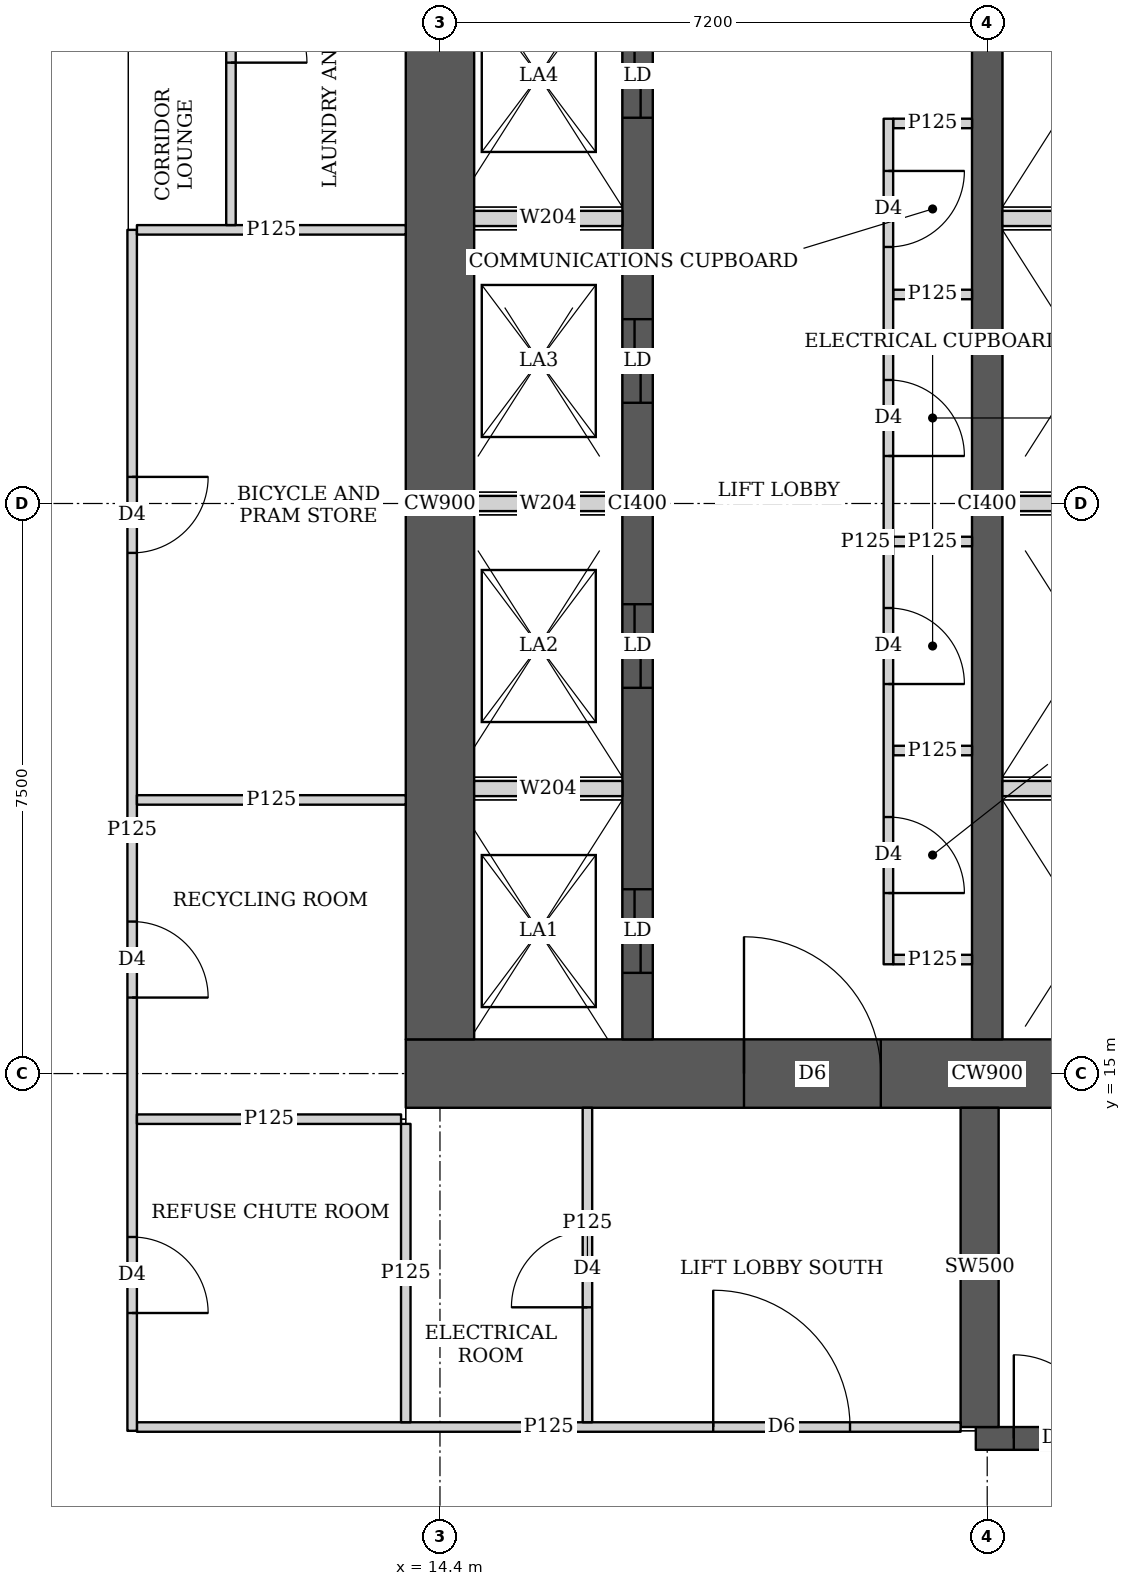
"""IFC4 building model, lengths in metres.
Left out: names, types, materials, properties, quantities, classifications, styles, units other than length and angle.
Written with IfcOpenShell. Run it as: python <this file> out.ifc"""

import sys

from ifc_helpers import new_model, si_unit, direction, frame, frame_2d, origin, place, context, subcontext, project, spatial, rectangle, extrude, element, fill, save


model = new_model("IFC4")
c1 = context("Model", 3, precision=1e-05, world=origin(), true_north=direction((0.0, 1.0)))
c2 = subcontext(c1, "Body", "Model", "MODEL_VIEW")
j1 = project(units=[si_unit("LENGTHUNIT", "METRE"), si_unit("PLANEANGLEUNIT", "RADIAN")], contexts=[c1])
p1 = place(None, origin())
s1 = spatial("IfcSite", under=j1, at=p1, CompositionType="ELEMENT")
p2 = place(p1, origin())
s2 = spatial("IfcBuilding", under=s1, at=p2, CompositionType="ELEMENT")
p3 = place(p2, frame((0.0, 0.0, 23.75)))
s3 = spatial("IfcBuildingStorey", under=s2, at=p3, CompositionType="ELEMENT", Elevation=23.75)
p4 = place(p3, frame((13.95, 15.0, 0.0), z_axis=(0.0, 0.0, 1.0), x_axis=(1.0, 0.0, 0.0)))
e1 = element("IfcWall", 1, at=p4, inside=s3, PredefinedType="SHEAR", context=c2, shape_type="SweptSolid", body=[
    extrude(rectangle(XDim=15.3, YDim=0.9, at=frame_2d((7.65, 0.0))), origin(), (0.0, 0.0, 1.0), 3.75),
])
p5 = place(p4, frame((4.45, 0.0, 0.0)))
e2 = element("IfcOpeningElement", 2, at=p5, cuts=e1, PredefinedType="OPENING", context=c2, shape_type="SweptSolid", body=[
    extrude(rectangle(XDim=1.8, YDim=2.1, at=frame_2d((0.9, 1.05))), frame((0.0, 0.46, 0.0), z_axis=(0.0, -1.0, 0.0), x_axis=(1.0, 0.0, 0.0)), (0.0, 0.0, 1.0), 0.92),
])
p6 = place(p4, frame((10.7, 0.0, 0.0)))
e3 = element("IfcOpeningElement", 3, at=p6, cuts=e1, PredefinedType="OPENING", context=c2, shape_type="SweptSolid", body=[
    extrude(rectangle(XDim=1.1, YDim=2.1, at=frame_2d((0.55, 1.05))), frame((0.0, 0.46, 0.0), z_axis=(0.0, -1.0, 0.0), x_axis=(1.0, 0.0, 0.0)), (0.0, 0.0, 1.0), 0.92),
])
p7 = place(p3, frame((14.4, 15.45, 0.0), z_axis=(0.0, 0.0, 1.0), x_axis=(0.0, 1.0, 0.0)))
e4 = element("IfcWall", 4, at=p7, inside=s3, PredefinedType="SHEAR", context=c2, shape_type="SweptSolid", body=[
    extrude(rectangle(XDim=14.1, YDim=0.9, at=frame_2d((7.05, 0.0))), origin(), (0.0, 0.0, 1.0), 3.75),
])
p8 = place(p3, frame((17.0, 15.45, 0.0), z_axis=(0.0, 0.0, 1.0), x_axis=(0.0, 1.0, 0.0)))
e5 = element("IfcWall", 5, at=p8, inside=s3, PredefinedType="SHEAR", context=c2, shape_type="SweptSolid", body=[
    extrude(rectangle(XDim=14.1, YDim=0.4, at=frame_2d((7.05, 0.0))), origin(), (0.0, 0.0, 1.0), 3.75),
])
p9 = place(p8, frame((0.875, 0.0, 0.0)))
e6 = element("IfcOpeningElement", 6, at=p9, cuts=e5, PredefinedType="OPENING", context=c2, shape_type="SweptSolid", body=[
    extrude(rectangle(XDim=1.1, YDim=2.1, at=frame_2d((0.55, 1.05))), frame((0.0, 0.21, 0.0), z_axis=(0.0, -1.0, 0.0), x_axis=(1.0, 0.0, 0.0)), (0.0, 0.0, 1.0), 0.42),
])
p10 = place(p8, frame((4.625, 0.0, 0.0)))
e7 = element("IfcOpeningElement", 7, at=p10, cuts=e5, PredefinedType="OPENING", context=c2, shape_type="SweptSolid", body=[
    extrude(rectangle(XDim=1.1, YDim=2.1, at=frame_2d((0.55, 1.05))), frame((0.0, 0.21, 0.0), z_axis=(0.0, -1.0, 0.0), x_axis=(1.0, 0.0, 0.0)), (0.0, 0.0, 1.0), 0.42),
])
p11 = place(p8, frame((8.375, 0.0, 0.0)))
e8 = element("IfcOpeningElement", 8, at=p11, cuts=e5, PredefinedType="OPENING", context=c2, shape_type="SweptSolid", body=[
    extrude(rectangle(XDim=1.1, YDim=2.1, at=frame_2d((0.55, 1.05))), frame((0.0, 0.21, 0.0), z_axis=(0.0, -1.0, 0.0), x_axis=(1.0, 0.0, 0.0)), (0.0, 0.0, 1.0), 0.42),
])
p12 = place(p8, frame((12.125, 0.0, 0.0)))
e9 = element("IfcOpeningElement", 9, at=p12, cuts=e5, PredefinedType="OPENING", context=c2, shape_type="SweptSolid", body=[
    extrude(rectangle(XDim=1.1, YDim=2.1, at=frame_2d((0.55, 1.05))), frame((0.0, 0.21, 0.0), z_axis=(0.0, -1.0, 0.0), x_axis=(1.0, 0.0, 0.0)), (0.0, 0.0, 1.0), 0.42),
])
p13 = place(p3, frame((21.6, 15.45, 0.0), z_axis=(0.0, 0.0, 1.0), x_axis=(0.0, 1.0, 0.0)))
e10 = element("IfcWall", 10, at=p13, inside=s3, PredefinedType="SHEAR", context=c2, shape_type="SweptSolid", body=[
    extrude(rectangle(XDim=14.1, YDim=0.4, at=frame_2d((7.05, 0.0))), origin(), (0.0, 0.0, 1.0), 3.75),
])
p14 = place(p3, frame((21.45, 10.2, 0.0), z_axis=(0.0, 0.0, 1.0), x_axis=(1.0, 0.0, 0.0)))
e11 = element("IfcWall", 11, at=p14, inside=s3, PredefinedType="SHEAR", context=c2, shape_type="SweptSolid", body=[
    extrude(rectangle(XDim=7.5, YDim=0.3, at=frame_2d((3.75, 0.0))), origin(), (0.0, 0.0, 1.0), 3.75),
])
p15 = place(p14, frame((0.5, 0.0, 0.0)))
e12 = element("IfcOpeningElement", 12, at=p15, cuts=e11, PredefinedType="OPENING", context=c2, shape_type="SweptSolid", body=[
    extrude(rectangle(XDim=1.1, YDim=2.1, at=frame_2d((0.55, 1.05))), frame((0.0, 0.16, 0.0), z_axis=(0.0, -1.0, 0.0), x_axis=(1.0, 0.0, 0.0)), (0.0, 0.0, 1.0), 0.32),
])
p16 = place(p3, frame((21.5, 10.35, 0.0), z_axis=(0.0, 0.0, 1.0), x_axis=(0.0, 1.0, 0.0)))
e13 = element("IfcWall", 13, at=p16, inside=s3, PredefinedType="SHEAR", context=c2, shape_type="SweptSolid", body=[
    extrude(rectangle(XDim=4.2, YDim=0.5, at=frame_2d((2.1, 0.0))), origin(), (0.0, 0.0, 1.0), 3.75),
])
p17 = place(p3, frame((10.35, 10.3, 0.0), z_axis=(0.0, 0.0, 1.0), x_axis=(0.0, 1.0, 0.0)))
e14 = element("IfcWall", 14, at=p17, inside=s3, PredefinedType="PARTITIONING", context=c2, shape_type="SweptSolid", body=[
    extrude(rectangle(XDim=15.8, YDim=0.125, at=frame_2d((7.9, 0.0))), origin(), (0.0, 0.0, 1.0), 3.5),
])
p18 = place(p17, frame((1.55, 0.0, 0.0)))
e15 = element("IfcOpeningElement", 15, at=p18, cuts=e14, PredefinedType="OPENING", context=c2, shape_type="SweptSolid", body=[
    extrude(rectangle(XDim=1.0, YDim=2.1, at=frame_2d((0.5, 1.05))), frame((0.0, 0.073, 0.0), z_axis=(0.0, -1.0, 0.0), x_axis=(1.0, 0.0, 0.0)), (0.0, 0.0, 1.0), 0.145),
])
p19 = place(p17, frame((5.7, 0.0, 0.0)))
e16 = element("IfcOpeningElement", 16, at=p19, cuts=e14, PredefinedType="OPENING", context=c2, shape_type="SweptSolid", body=[
    extrude(rectangle(XDim=1.0, YDim=2.1, at=frame_2d((0.5, 1.05))), frame((0.0, 0.073, 0.0), z_axis=(0.0, -1.0, 0.0), x_axis=(1.0, 0.0, 0.0)), (0.0, 0.0, 1.0), 0.145),
])
p20 = place(p17, frame((11.55, 0.0, 0.0)))
e17 = element("IfcOpeningElement", 17, at=p20, cuts=e14, PredefinedType="OPENING", context=c2, shape_type="SweptSolid", body=[
    extrude(rectangle(XDim=1.0, YDim=2.1, at=frame_2d((0.5, 1.05))), frame((0.0, 0.073, 0.0), z_axis=(0.0, -1.0, 0.0), x_axis=(1.0, 0.0, 0.0)), (0.0, 0.0, 1.0), 0.145),
])
p21 = place(p3, frame((11.65, 26.163, 0.0), z_axis=(0.0, 0.0, 1.0), x_axis=(0.0, 1.0, 0.0)))
e18 = element("IfcWall", 18, at=p21, inside=s3, PredefinedType="PARTITIONING", context=c2, shape_type="SweptSolid", body=[
    extrude(rectangle(XDim=5.275, YDim=0.125, at=frame_2d((2.637, 0.0))), origin(), (0.0, 0.0, 1.0), 3.5),
])
p22 = place(p21, frame((2.137, 0.0, 0.0)))
e19 = element("IfcOpeningElement", 19, at=p22, cuts=e18, PredefinedType="OPENING", context=c2, shape_type="SweptSolid", body=[
    extrude(rectangle(XDim=1.0, YDim=2.1, at=frame_2d((0.5, 1.05))), frame((0.0, 0.073, 0.0), z_axis=(0.0, -1.0, 0.0), x_axis=(1.0, 0.0, 0.0)), (0.0, 0.0, 1.0), 0.145),
])
p23 = place(p3, frame((10.413, 14.4, 0.0), z_axis=(0.0, 0.0, 1.0), x_axis=(1.0, 0.0, 0.0)))
e20 = element("IfcWall", 20, at=p23, inside=s3, PredefinedType="PARTITIONING", context=c2, shape_type="SweptSolid", body=[
    extrude(rectangle(XDim=3.475, YDim=0.125, at=frame_2d((1.737, 0.0))), origin(), (0.0, 0.0, 1.0), 3.5),
])
for number, where, z_axis, x_axis in (
    (21, (10.413, 18.6, 0.0), (0.0, 0.0, 1.0), (1.0, 0.0, 0.0)),
    (22, (10.413, 26.1, 0.0), (0.0, 0.0, 1.0), (1.0, 0.0, 0.0)),
):
    element("IfcWall", number, at=place(p3, frame(where, z_axis=z_axis, x_axis=x_axis)), inside=s3, PredefinedType="PARTITIONING", context=c2, shape_type="SweptSolid", body=[
        extrude(rectangle(XDim=3.537, YDim=0.125, at=frame_2d((1.769, 0.0))), origin(), (0.0, 0.0, 1.0), 3.5),
    ])
p24 = place(p3, frame((13.95, 10.413, 0.0), z_axis=(0.0, 0.0, 1.0), x_axis=(0.0, 1.0, 0.0)))
e23 = element("IfcWall", 23, at=p24, inside=s3, PredefinedType="PARTITIONING", context=c2, shape_type="SweptSolid", body=[
    extrude(rectangle(XDim=3.925, YDim=0.125, at=frame_2d((1.962, 0.0))), origin(), (0.0, 0.0, 1.0), 3.5),
])
p25 = place(p3, frame((10.413, 10.35, 0.0), z_axis=(0.0, 0.0, 1.0), x_axis=(1.0, 0.0, 0.0)))
e24 = element("IfcWall", 24, at=p25, inside=s3, PredefinedType="PARTITIONING", context=c2, shape_type="SweptSolid", body=[
    extrude(rectangle(XDim=10.837, YDim=0.125, at=frame_2d((5.418, 0.0))), origin(), (0.0, 0.0, 1.0), 3.5),
])
p26 = place(p25, frame((7.582, 0.0, 0.0)))
e25 = element("IfcOpeningElement", 25, at=p26, cuts=e24, PredefinedType="OPENING", context=c2, shape_type="SweptSolid", body=[
    extrude(rectangle(XDim=1.8, YDim=2.1, at=frame_2d((0.9, 1.05))), frame((0.0, 0.073, 0.0), z_axis=(0.0, -1.0, 0.0), x_axis=(1.0, 0.0, 0.0)), (0.0, 0.0, 1.0), 0.145),
])
p27 = place(p3, frame((16.34, 10.413, 0.0), z_axis=(0.0, 0.0, 1.0), x_axis=(0.0, 1.0, 0.0)))
e26 = element("IfcWall", 26, at=p27, inside=s3, PredefinedType="PARTITIONING", context=c2, shape_type="SweptSolid", body=[
    extrude(rectangle(XDim=4.137, YDim=0.125, at=frame_2d((2.068, 0.0))), origin(), (0.0, 0.0, 1.0), 3.5),
])
p28 = place(p27, frame((1.512, 0.0, 0.0)))
e27 = element("IfcOpeningElement", 27, at=p28, cuts=e26, PredefinedType="OPENING", context=c2, shape_type="SweptSolid", body=[
    extrude(rectangle(XDim=1.0, YDim=2.1, at=frame_2d((0.5, 1.05))), frame((0.0, 0.073, 0.0), z_axis=(0.0, -1.0, 0.0), x_axis=(1.0, 0.0, 0.0)), (0.0, 0.0, 1.0), 0.145),
])
p29 = place(p3, frame((20.3, 16.438, 0.0), z_axis=(0.0, 0.0, 1.0), x_axis=(0.0, 1.0, 0.0)))
e28 = element("IfcWall", 28, at=p29, inside=s3, PredefinedType="PARTITIONING", context=c2, shape_type="SweptSolid", body=[
    extrude(rectangle(XDim=11.124, YDim=0.125, at=frame_2d((5.562, 0.0))), origin(), (0.0, 0.0, 1.0), 3.5),
])
p30 = place(p29, frame((0.937, 0.0, 0.0)))
e29 = element("IfcOpeningElement", 29, at=p30, cuts=e28, PredefinedType="OPENING", context=c2, shape_type="SweptSolid", body=[
    extrude(rectangle(XDim=1.0, YDim=2.1, at=frame_2d((0.5, 1.05))), frame((0.0, 0.073, 0.0), z_axis=(0.0, -1.0, 0.0), x_axis=(1.0, 0.0, 0.0)), (0.0, 0.0, 1.0), 0.145),
])
p31 = place(p29, frame((3.687, 0.0, 0.0)))
e30 = element("IfcOpeningElement", 30, at=p31, cuts=e28, PredefinedType="OPENING", context=c2, shape_type="SweptSolid", body=[
    extrude(rectangle(XDim=1.0, YDim=2.1, at=frame_2d((0.5, 1.05))), frame((0.0, 0.073, 0.0), z_axis=(0.0, -1.0, 0.0), x_axis=(1.0, 0.0, 0.0)), (0.0, 0.0, 1.0), 0.145),
])
p32 = place(p29, frame((6.687, 0.0, 0.0)))
e31 = element("IfcOpeningElement", 31, at=p32, cuts=e28, PredefinedType="OPENING", context=c2, shape_type="SweptSolid", body=[
    extrude(rectangle(XDim=1.0, YDim=2.1, at=frame_2d((0.5, 1.05))), frame((0.0, 0.073, 0.0), z_axis=(0.0, -1.0, 0.0), x_axis=(1.0, 0.0, 0.0)), (0.0, 0.0, 1.0), 0.145),
])
p33 = place(p29, frame((9.437, 0.0, 0.0)))
e32 = element("IfcOpeningElement", 32, at=p33, cuts=e28, PredefinedType="OPENING", context=c2, shape_type="SweptSolid", body=[
    extrude(rectangle(XDim=1.0, YDim=2.1, at=frame_2d((0.5, 1.05))), frame((0.0, 0.073, 0.0), z_axis=(0.0, -1.0, 0.0), x_axis=(1.0, 0.0, 0.0)), (0.0, 0.0, 1.0), 0.145),
])
for number, where, z_axis, x_axis in (
    (33, (20.363, 16.5, 0.0), (0.0, 0.0, 1.0), (1.0, 0.0, 0.0)),
    (34, (20.363, 27.5, 0.0), (0.0, 0.0, 1.0), (1.0, 0.0, 0.0)),
    (35, (20.363, 19.25, 0.0), (0.0, 0.0, 1.0), (1.0, 0.0, 0.0)),
    (36, (20.363, 22.0, 0.0), (0.0, 0.0, 1.0), (1.0, 0.0, 0.0)),
    (37, (20.363, 25.25, 0.0), (0.0, 0.0, 1.0), (1.0, 0.0, 0.0)),
):
    element("IfcWall", number, at=place(p3, frame(where, z_axis=z_axis, x_axis=x_axis)), inside=s3, PredefinedType="PARTITIONING", context=c2, shape_type="SweptSolid", body=[
        extrude(rectangle(XDim=1.037, YDim=0.125, at=frame_2d((0.519, 0.0))), origin(), (0.0, 0.0, 1.0), 3.5),
    ])
p34 = place(p3, frame((14.85, 18.75, 0.0), z_axis=(0.0, 0.0, 1.0), x_axis=(1.0, 0.0, 0.0)))
e38 = element("IfcWall", 38, at=p34, inside=s3, PredefinedType="SOLIDWALL", context=c2, shape_type="SweptSolid", body=[
    extrude(rectangle(XDim=1.95, YDim=0.2, at=frame_2d((0.975, 0.0))), origin(), (0.0, 0.0, 1.0), 3.5),
])
p35 = place(p3, frame((21.8, 18.75, 0.0), z_axis=(0.0, 0.0, 1.0), x_axis=(1.0, 0.0, 0.0)))
e39 = element("IfcWall", 39, at=p35, inside=s3, PredefinedType="SOLIDWALL", context=c2, shape_type="SweptSolid", body=[
    extrude(rectangle(XDim=2.2, YDim=0.2, at=frame_2d((1.1, 0.0))), origin(), (0.0, 0.0, 1.0), 3.5),
])
p36 = place(p3, frame((14.85, 22.5, 0.0), z_axis=(0.0, 0.0, 1.0), x_axis=(1.0, 0.0, 0.0)))
e40 = element("IfcWall", 40, at=p36, inside=s3, PredefinedType="SOLIDWALL", context=c2, shape_type="SweptSolid", body=[
    extrude(rectangle(XDim=1.95, YDim=0.2, at=frame_2d((0.975, 0.0))), origin(), (0.0, 0.0, 1.0), 3.5),
])
p37 = place(p3, frame((21.8, 22.5, 0.0), z_axis=(0.0, 0.0, 1.0), x_axis=(1.0, 0.0, 0.0)))
e41 = element("IfcWall", 41, at=p37, inside=s3, PredefinedType="SOLIDWALL", context=c2, shape_type="SweptSolid", body=[
    extrude(rectangle(XDim=2.2, YDim=0.2, at=frame_2d((1.1, 0.0))), origin(), (0.0, 0.0, 1.0), 3.5),
])
p38 = place(p3, frame((14.85, 26.25, 0.0), z_axis=(0.0, 0.0, 1.0), x_axis=(1.0, 0.0, 0.0)))
e42 = element("IfcWall", 42, at=p38, inside=s3, PredefinedType="SOLIDWALL", context=c2, shape_type="SweptSolid", body=[
    extrude(rectangle(XDim=1.95, YDim=0.2, at=frame_2d((0.975, 0.0))), origin(), (0.0, 0.0, 1.0), 3.5),
])
p39 = place(p3, frame((21.8, 26.25, 0.0), z_axis=(0.0, 0.0, 1.0), x_axis=(1.0, 0.0, 0.0)))
e43 = element("IfcWall", 43, at=p39, inside=s3, PredefinedType="SOLIDWALL", context=c2, shape_type="SweptSolid", body=[
    extrude(rectangle(XDim=2.2, YDim=0.2, at=frame_2d((1.1, 0.0))), origin(), (0.0, 0.0, 1.0), 3.5),
])
p40 = place(p18, origin())
e44 = element("IfcDoor", 44, at=p40, inside=s3, OperationType="SINGLE_SWING_RIGHT", PredefinedType="DOOR", context=c2, shape_type="SweptSolid", body=[
    extrude(rectangle(XDim=1.0, YDim=2.1, at=frame_2d((0.5, 1.05))), frame((0.0, 0.025, 0.0), z_axis=(0.0, -1.0, 0.0), x_axis=(1.0, 0.0, 0.0)), (0.0, 0.0, 1.0), 0.05),
])
fill(e15, e44)
p41 = place(p19, origin())
e45 = element("IfcDoor", 45, at=p41, inside=s3, OperationType="SINGLE_SWING_RIGHT", PredefinedType="DOOR", context=c2, shape_type="SweptSolid", body=[
    extrude(rectangle(XDim=1.0, YDim=2.1, at=frame_2d((0.5, 1.05))), frame((0.0, 0.025, 0.0), z_axis=(0.0, -1.0, 0.0), x_axis=(1.0, 0.0, 0.0)), (0.0, 0.0, 1.0), 0.05),
])
fill(e16, e45)
p42 = place(p20, origin())
e46 = element("IfcDoor", 46, at=p42, inside=s3, OperationType="SINGLE_SWING_LEFT", PredefinedType="DOOR", context=c2, shape_type="SweptSolid", body=[
    extrude(rectangle(XDim=1.0, YDim=2.1, at=frame_2d((0.5, 1.05))), frame((0.0, 0.025, 0.0), z_axis=(0.0, -1.0, 0.0), x_axis=(1.0, 0.0, 0.0)), (0.0, 0.0, 1.0), 0.05),
])
fill(e17, e46)
p43 = place(p22, origin())
e47 = element("IfcDoor", 47, at=p43, inside=s3, OperationType="SINGLE_SWING_RIGHT", PredefinedType="DOOR", context=c2, shape_type="SweptSolid", body=[
    extrude(rectangle(XDim=1.0, YDim=2.1, at=frame_2d((0.5, 1.05))), frame((0.0, 0.025, 0.0), z_axis=(0.0, -1.0, 0.0), x_axis=(1.0, 0.0, 0.0)), (0.0, 0.0, 1.0), 0.05),
])
fill(e19, e47)
p44 = place(p28, origin())
e48 = element("IfcDoor", 48, at=p44, inside=s3, OperationType="SINGLE_SWING_LEFT", PredefinedType="DOOR", context=c2, shape_type="SweptSolid", body=[
    extrude(rectangle(XDim=1.0, YDim=2.1, at=frame_2d((0.5, 1.05))), frame((0.0, 0.025, 0.0), z_axis=(0.0, -1.0, 0.0), x_axis=(1.0, 0.0, 0.0)), (0.0, 0.0, 1.0), 0.05),
])
fill(e27, e48)
p45 = place(p26, origin())
e49 = element("IfcDoor", 49, at=p45, inside=s3, OperationType="DOUBLE_DOOR_SINGLE_SWING", PredefinedType="DOOR", context=c2, shape_type="SweptSolid", body=[
    extrude(rectangle(XDim=1.8, YDim=2.1, at=frame_2d((0.9, 1.05))), frame((0.0, 0.025, 0.0), z_axis=(0.0, -1.0, 0.0), x_axis=(1.0, 0.0, 0.0)), (0.0, 0.0, 1.0), 0.05),
])
fill(e25, e49)
p46 = place(p30, origin())
e50 = element("IfcDoor", 50, at=p46, inside=s3, OperationType="SINGLE_SWING_RIGHT", PredefinedType="DOOR", context=c2, shape_type="SweptSolid", body=[
    extrude(rectangle(XDim=1.0, YDim=2.1, at=frame_2d((0.5, 1.05))), frame((0.0, 0.025, 0.0), z_axis=(0.0, -1.0, 0.0), x_axis=(1.0, 0.0, 0.0)), (0.0, 0.0, 1.0), 0.05),
])
fill(e29, e50)
p47 = place(p31, origin())
e51 = element("IfcDoor", 51, at=p47, inside=s3, OperationType="SINGLE_SWING_RIGHT", PredefinedType="DOOR", context=c2, shape_type="SweptSolid", body=[
    extrude(rectangle(XDim=1.0, YDim=2.1, at=frame_2d((0.5, 1.05))), frame((0.0, 0.025, 0.0), z_axis=(0.0, -1.0, 0.0), x_axis=(1.0, 0.0, 0.0)), (0.0, 0.0, 1.0), 0.05),
])
fill(e30, e51)
p48 = place(p32, origin())
e52 = element("IfcDoor", 52, at=p48, inside=s3, OperationType="SINGLE_SWING_RIGHT", PredefinedType="DOOR", context=c2, shape_type="SweptSolid", body=[
    extrude(rectangle(XDim=1.0, YDim=2.1, at=frame_2d((0.5, 1.05))), frame((0.0, 0.025, 0.0), z_axis=(0.0, -1.0, 0.0), x_axis=(1.0, 0.0, 0.0)), (0.0, 0.0, 1.0), 0.05),
])
fill(e31, e52)
p49 = place(p33, origin())
e53 = element("IfcDoor", 53, at=p49, inside=s3, OperationType="SINGLE_SWING_LEFT", PredefinedType="DOOR", context=c2, shape_type="SweptSolid", body=[
    extrude(rectangle(XDim=1.0, YDim=2.1, at=frame_2d((0.5, 1.05))), frame((0.0, 0.025, 0.0), z_axis=(0.0, -1.0, 0.0), x_axis=(1.0, 0.0, 0.0)), (0.0, 0.0, 1.0), 0.05),
])
fill(e32, e53)
p50 = place(p5, origin())
e54 = element("IfcDoor", 54, at=p50, inside=s3, OperationType="DOUBLE_DOOR_SINGLE_SWING", PredefinedType="DOOR", context=c2, shape_type="SweptSolid", body=[
    extrude(rectangle(XDim=1.8, YDim=2.1, at=frame_2d((0.9, 1.05))), frame((0.0, 0.025, 0.0), z_axis=(0.0, -1.0, 0.0), x_axis=(1.0, 0.0, 0.0)), (0.0, 0.0, 1.0), 0.05),
])
fill(e2, e54)
p51 = place(p9, origin())
e55 = element("IfcDoor", 55, at=p51, inside=s3, OperationType="DOUBLE_DOOR_SLIDING", PredefinedType="DOOR", context=c2, shape_type="SweptSolid", body=[
    extrude(rectangle(XDim=1.1, YDim=2.1, at=frame_2d((0.55, 1.05))), frame((0.0, 0.025, 0.0), z_axis=(0.0, -1.0, 0.0), x_axis=(1.0, 0.0, 0.0)), (0.0, 0.0, 1.0), 0.05),
])
fill(e6, e55)
p52 = place(p10, origin())
e56 = element("IfcDoor", 56, at=p52, inside=s3, OperationType="DOUBLE_DOOR_SLIDING", PredefinedType="DOOR", context=c2, shape_type="SweptSolid", body=[
    extrude(rectangle(XDim=1.1, YDim=2.1, at=frame_2d((0.55, 1.05))), frame((0.0, 0.025, 0.0), z_axis=(0.0, -1.0, 0.0), x_axis=(1.0, 0.0, 0.0)), (0.0, 0.0, 1.0), 0.05),
])
fill(e7, e56)
p53 = place(p11, origin())
e57 = element("IfcDoor", 57, at=p53, inside=s3, OperationType="DOUBLE_DOOR_SLIDING", PredefinedType="DOOR", context=c2, shape_type="SweptSolid", body=[
    extrude(rectangle(XDim=1.1, YDim=2.1, at=frame_2d((0.55, 1.05))), frame((0.0, 0.025, 0.0), z_axis=(0.0, -1.0, 0.0), x_axis=(1.0, 0.0, 0.0)), (0.0, 0.0, 1.0), 0.05),
])
fill(e8, e57)
p54 = place(p12, origin())
e58 = element("IfcDoor", 58, at=p54, inside=s3, OperationType="DOUBLE_DOOR_SLIDING", PredefinedType="DOOR", context=c2, shape_type="SweptSolid", body=[
    extrude(rectangle(XDim=1.1, YDim=2.1, at=frame_2d((0.55, 1.05))), frame((0.0, 0.025, 0.0), z_axis=(0.0, -1.0, 0.0), x_axis=(1.0, 0.0, 0.0)), (0.0, 0.0, 1.0), 0.05),
])
fill(e9, e58)
p55 = place(p15, origin())
e59 = element("IfcDoor", 59, at=p55, inside=s3, OperationType="SINGLE_SWING_LEFT", PredefinedType="DOOR", context=c2, shape_type="SweptSolid", body=[
    extrude(rectangle(XDim=1.1, YDim=2.1, at=frame_2d((0.55, 1.05))), frame((0.0, 0.025, 0.0), z_axis=(0.0, -1.0, 0.0), x_axis=(1.0, 0.0, 0.0)), (0.0, 0.0, 1.0), 0.05),
])
fill(e12, e59)
save(model, sys.argv[1])
